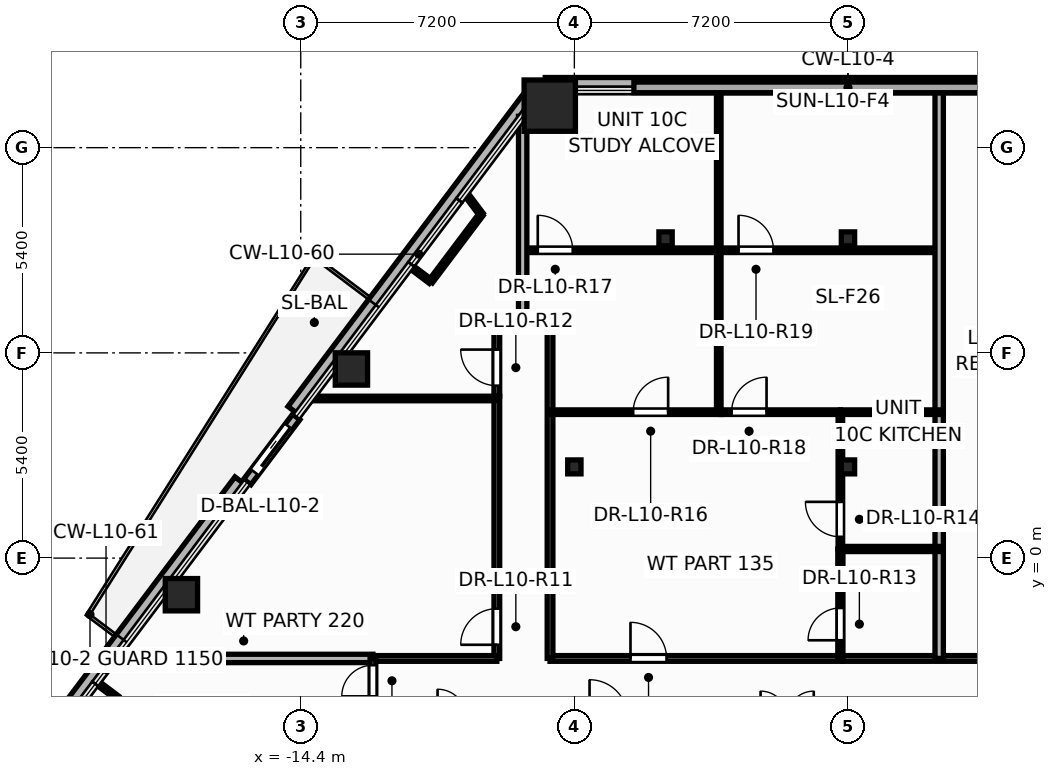
"""IFC4 building model, lengths in metres.
Left out: names, types, materials, properties, quantities, classifications, styles, units other than length and angle.
Written with IfcOpenShell. Run it as: python <this file> out.ifc"""

import sys

from ifc_helpers import new_model, si_unit, direction, frame, frame_2d, origin, origin_2d, place, context, subcontext, project, spatial, rectangle, hollow_rectangle, hollow_circle, i_section, extrude, element, fill, save


model = new_model("IFC4")
c1 = context("Model", 3, precision=1e-05, world=origin(), true_north=direction((0.0, 1.0)))
c2 = subcontext(c1, "Body", "Model", "MODEL_VIEW")
j1 = project(units=[si_unit("LENGTHUNIT", "METRE"), si_unit("PLANEANGLEUNIT", "RADIAN")], contexts=[c1])
p1 = place(None, origin())
s1 = spatial("IfcSite", under=j1, at=p1, CompositionType="ELEMENT")
p2 = place(p1, origin())
s2 = spatial("IfcBuilding", under=s1, at=p2, CompositionType="ELEMENT")
p3 = place(p2, frame((0.0, 0.0, 42.3)))
s3 = spatial("IfcBuildingStorey", under=s2, at=p3, CompositionType="ELEMENT", Elevation=42.3)
p4 = place(p3, frame((-7.847, 11.906, 0.0), z_axis=(0.0, 0.0, 1.0), x_axis=(1.0, 0.0, 0.0)))
e1 = element("IfcColumn", 1, at=p4, inside=s3, PredefinedType="COLUMN", context=c2, shape_type="SweptSolid", body=[
    extrude(hollow_rectangle(XDim=1.35, YDim=1.35, WallThickness=0.065, at=origin_2d()), origin(), (0.0, 0.0, 1.0), 3.6),
])
for number, where, z_axis, x_axis in (
    (2, (-13.066, 4.976, 0.0), (0.0, 0.0, 1.0), (1.0, 0.0, 0.0)),
    (3, (-17.54, -0.963, 0.0), (0.0, 0.0, 1.0), (1.0, 0.0, 0.0)),
):
    element("IfcColumn", number, at=place(p3, frame(where, z_axis=z_axis, x_axis=x_axis)), inside=s3, PredefinedType="COLUMN", context=c2, shape_type="SweptSolid", body=[
        extrude(hollow_circle(Radius=0.425, WallThickness=0.038, at=origin_2d()), origin(), (0.0, 0.0, 1.0), 3.6),
    ])
for number, where, z_axis, x_axis in (
    (4, (-7.2, 2.4, 0.0), (0.0, 0.0, 1.0), (1.0, 0.0, 0.0)),
    (5, (0.0, 2.4, 0.0), (0.0, 0.0, 1.0), (1.0, 0.0, 0.0)),
    (6, (-4.8, 8.4, 0.0), (0.0, 0.0, 1.0), (1.0, 0.0, 0.0)),
    (7, (0.0, 8.4, 0.0), (0.0, 0.0, 1.0), (1.0, 0.0, 0.0)),
):
    element("IfcColumn", number, at=place(p3, frame(where, z_axis=z_axis, x_axis=x_axis)), inside=s3, PredefinedType="COLUMN", context=c2, shape_type="SweptSolid", body=[
        extrude(i_section(OverallWidth=0.35, OverallDepth=0.367, WebThickness=0.025, FlangeThickness=0.032, at=origin_2d()), origin(), (0.0, 0.0, 1.0), 3.6),
    ])
p5 = place(p3, frame((7.967, 12.466, -0.2), z_axis=(0.0, 0.0, 1.0), x_axis=(-1.0, 0.0, 0.0)))
e8 = element("IfcWall", 8, at=p5, inside=s3, PredefinedType="PARAPET", context=c2, shape_type="SweptSolid", body=[
    extrude(rectangle(XDim=15.934, YDim=0.36, at=frame_2d((7.967, 0.0))), origin(), (0.0, 0.0, 1.0), 0.38),
])
p6 = place(p3, frame((-8.247, 12.306, -0.2), z_axis=(0.0, 0.0, 1.0), x_axis=(-0.6016246984, -0.798778894486, 0.0)))
e9 = element("IfcWall", 9, at=p6, inside=s3, PredefinedType="PARAPET", context=c2, shape_type="SweptSolid", body=[
    extrude(rectangle(XDim=10.547, YDim=0.36, at=frame_2d((5.273, 0.0))), origin(), (0.0, 0.0, 1.0), 0.38),
])
p7 = place(p3, frame((-15.988, 2.029, -0.2), z_axis=(0.0, 0.0, 1.0), x_axis=(-0.601631217198, -0.798773984612, 0.0)))
e10 = element("IfcWall", 10, at=p7, inside=s3, PredefinedType="PARAPET", context=c2, shape_type="SweptSolid", body=[
    extrude(rectangle(XDim=12.18, YDim=0.36, at=frame_2d((6.09, 0.0))), origin(), (0.0, 0.0, 1.0), 0.38),
])
p8 = place(p3, frame((-14.518, 3.713, -0.015), z_axis=(0.0, 0.0, 1.0), x_axis=(-0.601696267697, -0.79872498486, 0.0)))
e11 = element("IfcWall", 11, at=p8, inside=s3, PredefinedType="STANDARD", context=c2, shape_type="SweptSolid", body=[
    extrude(rectangle(XDim=2.14, YDim=0.24, at=frame_2d((1.07, 0.0))), origin(), (0.0, 0.0, 1.0), 2.729),
])
p9 = place(p8, frame((0.32, 0.0, 0.015)))
e12 = element("IfcOpeningElement", 12, at=p9, cuts=e11, PredefinedType="OPENING", context=c2, shape_type="SweptSolid", body=[
    extrude(rectangle(XDim=1.506, YDim=2.204, at=frame_2d((0.75, 1.102))), frame((0.0, 0.13, 0.0), z_axis=(0.0, -1.0, 0.0), x_axis=(1.0, 0.0, 0.0)), (0.0, 0.0, 1.0), 0.26),
])
p10 = place(p3, frame((-7.84, -2.64, 0.0), z_axis=(0.0, 0.0, 1.0), x_axis=(1.0, 0.0, 0.0)))
e13 = element("IfcWall", 13, at=p10, inside=s3, PredefinedType="PARTITIONING", context=c2, shape_type="SweptSolid", body=[
    extrude(rectangle(XDim=7.7, YDim=0.15, at=frame_2d((3.85, 0.0))), origin(), (0.0, 0.0, 1.0), 2.325),
])
p11 = place(p10, frame((2.117, 0.0, 0.0)))
e14 = element("IfcOpeningElement", 14, at=p11, cuts=e13, PredefinedType="OPENING", context=c2, shape_type="SweptSolid", body=[
    extrude(rectangle(XDim=0.956, YDim=2.104, at=frame_2d((0.475, 1.052))), frame((0.0, 0.085, 0.0), z_axis=(0.0, -1.0, 0.0), x_axis=(1.0, 0.0, 0.0)), (0.0, 0.0, 1.0), 0.17),
])
p12 = place(p3, frame((-9.24, -2.64, 0.0), z_axis=(0.0, 0.0, 1.0), x_axis=(0.0, 1.0, 0.0)))
e15 = element("IfcWall", 15, at=p12, inside=s3, PredefinedType="PARTITIONING", context=c2, shape_type="SweptSolid", body=[
    extrude(rectangle(XDim=6.9, YDim=0.15, at=frame_2d((3.45, 0.0))), origin(), (0.0, 0.0, 1.0), 2.509),
])
p13 = place(p12, frame((0.36, 0.0, 0.0)))
e16 = element("IfcOpeningElement", 16, at=p13, cuts=e15, PredefinedType="OPENING", context=c2, shape_type="SweptSolid", body=[
    extrude(rectangle(XDim=0.956, YDim=2.104, at=frame_2d((0.475, 1.052))), frame((0.0, 0.085, 0.0), z_axis=(0.0, -1.0, 0.0), x_axis=(1.0, 0.0, 0.0)), (0.0, 0.0, 1.0), 0.17),
])
p14 = place(p3, frame((-19.304, -2.64, 0.0), z_axis=(0.0, 0.0, 1.0), x_axis=(1.0, 0.0, 0.0)))
e17 = element("IfcWall", 17, at=p14, inside=s3, PredefinedType="PARTITIONING", context=c2, shape_type="SweptSolid", body=[
    extrude(rectangle(XDim=6.804, YDim=0.22, at=frame_2d((3.402, 0.0))), origin(), (0.0, 0.0, 1.0), 2.713),
])
p15 = place(p3, frame((-7.84, -2.64, 0.0), z_axis=(0.0, 0.0, 1.0), x_axis=(0.0, 1.0, 0.0)))
e18 = element("IfcWall", 18, at=p15, inside=s3, PredefinedType="PARTITIONING", context=c2, shape_type="SweptSolid", body=[
    extrude(rectangle(XDim=8.84, YDim=0.15, at=frame_2d((4.42, 0.0))), origin(), (0.0, 0.0, 1.0), 2.509),
])
p16 = place(p3, frame((-3.4, 8.1, 0.0), z_axis=(0.0, 0.0, 1.0), x_axis=(1.0, 0.0, 0.0)))
e19 = element("IfcWall", 19, at=p16, inside=s3, PredefinedType="PARTITIONING", context=c2, shape_type="SweptSolid", body=[
    extrude(rectangle(XDim=5.8, YDim=0.12, at=frame_2d((2.9, 0.0))), origin(), (0.0, 0.0, 1.0), 2.325),
])
p17 = place(p16, frame((0.52, 0.0, 0.0)))
e20 = element("IfcOpeningElement", 20, at=p17, cuts=e19, PredefinedType="OPENING", context=c2, shape_type="SweptSolid", body=[
    extrude(rectangle(XDim=0.926, YDim=2.104, at=frame_2d((0.46, 1.052))), frame((0.0, 0.07, 0.0), z_axis=(0.0, -1.0, 0.0), x_axis=(1.0, 0.0, 0.0)), (0.0, 0.0, 1.0), 0.14),
])
p18 = place(p3, frame((-0.138, -2.64, 0.0), z_axis=(0.0, 0.0, 1.0), x_axis=(1.0, 0.0, 0.0)))
e21 = element("IfcWall", 21, at=p18, inside=s3, PredefinedType="PARTITIONING", context=c2, shape_type="SweptSolid", body=[
    extrude(rectangle(XDim=7.978, YDim=0.15, at=frame_2d((3.989, 0.0))), origin(), (0.0, 0.0, 1.0), 2.325),
])
p19 = place(p3, frame((-8.56, 8.1, 0.0), z_axis=(0.0, 0.0, 1.0), x_axis=(1.0, 0.0, 0.0)))
e22 = element("IfcWall", 22, at=p19, inside=s3, PredefinedType="PARTITIONING", context=c2, shape_type="SweptSolid", body=[
    extrude(rectangle(XDim=5.16, YDim=0.12, at=frame_2d((2.58, 0.0))), origin(), (0.0, 0.0, 1.0), 2.509),
])
p20 = place(p19, frame((0.397, 0.0, 0.0)))
e23 = element("IfcOpeningElement", 23, at=p20, cuts=e22, PredefinedType="OPENING", context=c2, shape_type="SweptSolid", body=[
    extrude(rectangle(XDim=0.926, YDim=2.104, at=frame_2d((0.46, 1.052))), frame((0.0, 0.07, 0.0), z_axis=(0.0, -1.0, 0.0), x_axis=(1.0, 0.0, 0.0)), (0.0, 0.0, 1.0), 0.14),
])
p21 = place(p3, frame((-14.152, 4.2, 0.0), z_axis=(0.0, 0.0, 1.0), x_axis=(1.0, 0.0, 0.0)))
e24 = element("IfcWall", 24, at=p21, inside=s3, PredefinedType="PARTITIONING", context=c2, shape_type="SweptSolid", body=[
    extrude(rectangle(XDim=4.912, YDim=0.12, at=frame_2d((2.456, 0.0))), origin(), (0.0, 0.0, 1.0), 2.713),
])
p22 = place(p3, frame((-7.84, 3.84, 0.0), z_axis=(0.0, 0.0, 1.0), x_axis=(1.0, 0.0, 0.0)))
e25 = element("IfcWall", 25, at=p22, inside=s3, PredefinedType="PARTITIONING", context=c2, shape_type="SweptSolid", body=[
    extrude(rectangle(XDim=4.5, YDim=0.12, at=frame_2d((2.25, 0.0))), origin(), (0.0, 0.0, 1.0), 2.509),
])
p23 = place(p22, frame((2.188, 0.0, 0.0)))
e26 = element("IfcOpeningElement", 26, at=p23, cuts=e25, PredefinedType="OPENING", context=c2, shape_type="SweptSolid", body=[
    extrude(rectangle(XDim=0.926, YDim=2.104, at=frame_2d((0.46, 1.052))), frame((0.0, 0.07, 0.0), z_axis=(0.0, -1.0, 0.0), x_axis=(1.0, 0.0, 0.0)), (0.0, 0.0, 1.0), 0.14),
])
p24 = place(p3, frame((-3.4, 3.84, 0.0), z_axis=(0.0, 0.0, 1.0), x_axis=(0.0, 1.0, 0.0)))
e27 = element("IfcWall", 27, at=p24, inside=s3, PredefinedType="PARTITIONING", context=c2, shape_type="SweptSolid", body=[
    extrude(rectangle(XDim=8.466, YDim=0.12, at=frame_2d((4.233, 0.0))), origin(), (0.0, 0.0, 1.0), 2.509),
])
p25 = place(p3, frame((2.4, -2.64, 0.0), z_axis=(0.0, 0.0, 1.0), x_axis=(0.0, 1.0, 0.0)))
e28 = element("IfcWall", 28, at=p25, inside=s3, PredefinedType="PARTITIONING", context=c2, shape_type="SweptSolid", body=[
    extrude(rectangle(XDim=14.946, YDim=0.22, at=frame_2d((7.473, 0.0))), origin(), (0.0, 0.0, 1.0), 2.325),
])
p26 = place(p3, frame((-0.2, 0.24, 0.0), z_axis=(0.0, 0.0, 1.0), x_axis=(0.0, 1.0, 0.0)))
e29 = element("IfcWall", 29, at=p26, inside=s3, PredefinedType="PARTITIONING", context=c2, shape_type="SweptSolid", body=[
    extrude(rectangle(XDim=3.6, YDim=0.12, at=frame_2d((1.8, 0.0))), origin(), (0.0, 0.0, 1.0), 2.325),
])
p27 = place(p26, frame((0.32, 0.0, 0.0)))
e30 = element("IfcOpeningElement", 30, at=p27, cuts=e29, PredefinedType="OPENING", context=c2, shape_type="SweptSolid", body=[
    extrude(rectangle(XDim=0.926, YDim=2.104, at=frame_2d((0.46, 1.052))), frame((0.0, 0.07, 0.0), z_axis=(0.0, -1.0, 0.0), x_axis=(1.0, 0.0, 0.0)), (0.0, 0.0, 1.0), 0.14),
])
p28 = place(p3, frame((-8.56, 6.2, 0.0), z_axis=(0.0, 0.0, 1.0), x_axis=(0.0, 1.0, 0.0)))
e31 = element("IfcWall", 31, at=p28, inside=s3, PredefinedType="PARTITIONING", context=c2, shape_type="SweptSolid", body=[
    extrude(rectangle(XDim=5.425, YDim=0.22, at=frame_2d((2.712, 0.0))), origin(), (0.0, 0.0, 1.0), 2.509),
])
p29 = place(p3, frame((-12.5, -2.64, 0.0), z_axis=(0.0, 0.0, 1.0), x_axis=(1.0, 0.0, 0.0)))
e32 = element("IfcWall", 32, at=p29, inside=s3, PredefinedType="PARTITIONING", context=c2, shape_type="SweptSolid", body=[
    extrude(rectangle(XDim=3.26, YDim=0.15, at=frame_2d((1.63, 0.0))), origin(), (0.0, 0.0, 1.0), 3.35),
])
p30 = place(p3, frame((-3.338, 3.84, 0.0), z_axis=(0.0, 0.0, 1.0), x_axis=(1.0, 0.0, 0.0)))
e33 = element("IfcWall", 33, at=p30, inside=s3, PredefinedType="PARTITIONING", context=c2, shape_type="SweptSolid", body=[
    extrude(rectangle(XDim=3.138, YDim=0.12, at=frame_2d((1.569, 0.0))), origin(), (0.0, 0.0, 1.0), 2.325),
])
p31 = place(p30, frame((0.275, 0.0, 0.0)))
e34 = element("IfcOpeningElement", 34, at=p31, cuts=e33, PredefinedType="OPENING", context=c2, shape_type="SweptSolid", body=[
    extrude(rectangle(XDim=0.926, YDim=2.104, at=frame_2d((0.46, 1.052))), frame((0.0, 0.07, 0.0), z_axis=(0.0, -1.0, 0.0), x_axis=(1.0, 0.0, 0.0)), (0.0, 0.0, 1.0), 0.14),
])
p32 = place(p3, frame((-0.2, -2.64, 0.0), z_axis=(0.0, 0.0, 1.0), x_axis=(0.0, 1.0, 0.0)))
e35 = element("IfcWall", 35, at=p32, inside=s3, PredefinedType="PARTITIONING", context=c2, shape_type="SweptSolid", body=[
    extrude(rectangle(XDim=2.88, YDim=0.135, at=frame_2d((1.44, 0.0))), origin(), (0.0, 0.0, 1.0), 2.325),
])
p33 = place(p32, frame((0.478, 0.0, 0.0)))
e36 = element("IfcOpeningElement", 36, at=p33, cuts=e35, PredefinedType="OPENING", context=c2, shape_type="SweptSolid", body=[
    extrude(rectangle(XDim=0.856, YDim=2.104, at=frame_2d((0.425, 1.052))), frame((0.0, 0.078, 0.0), z_axis=(0.0, -1.0, 0.0), x_axis=(1.0, 0.0, 0.0)), (0.0, 0.0, 1.0), 0.155),
])
p34 = place(p3, frame((-0.2, 0.24, 0.0), z_axis=(0.0, 0.0, 1.0), x_axis=(1.0, 0.0, 0.0)))
e37 = element("IfcWall", 37, at=p34, inside=s3, PredefinedType="PARTITIONING", context=c2, shape_type="SweptSolid", body=[
    extrude(rectangle(XDim=2.6, YDim=0.135, at=frame_2d((1.3, 0.0))), origin(), (0.0, 0.0, 1.0), 2.325),
])
p35 = place(p3, frame((-0.2, 3.84, 0.0), z_axis=(0.0, 0.0, 1.0), x_axis=(1.0, 0.0, 0.0)))
e38 = element("IfcWall", 38, at=p35, inside=s3, PredefinedType="PARTITIONING", context=c2, shape_type="SweptSolid", body=[
    extrude(rectangle(XDim=2.6, YDim=0.12, at=frame_2d((1.3, 0.0))), origin(), (0.0, 0.0, 1.0), 2.325),
])
p36 = place(p3, frame((-9.651, 9.046, 0.0), z_axis=(0.0, 0.0, 1.0), x_axis=(-0.60167490335, -0.798741078622, 0.0)))
e39 = element("IfcWall", 39, at=p36, inside=s3, PredefinedType="PARTITIONING", context=c2, shape_type="SweptSolid", body=[
    extrude(rectangle(XDim=2.214, YDim=0.12, at=frame_2d((1.107, 0.0))), origin(), (0.0, 0.0, 1.0), 3.35),
])
p37 = place(p3, frame((-9.24, 4.262, 0.0), z_axis=(0.0, 0.0, 1.0), x_axis=(0.0, 1.0, 0.0)))
e40 = element("IfcWall", 40, at=p37, inside=s3, PredefinedType="PARTITIONING", context=c2, shape_type="SweptSolid", body=[
    extrude(rectangle(XDim=1.938, YDim=0.15, at=frame_2d((0.969, 0.0))), origin(), (0.0, 0.0, 1.0), 3.35),
])
p38 = place(p37, frame((0.275, 0.0, 0.0)))
e41 = element("IfcOpeningElement", 41, at=p38, cuts=e40, PredefinedType="OPENING", context=c2, shape_type="SweptSolid", body=[
    extrude(rectangle(XDim=0.956, YDim=2.104, at=frame_2d((0.475, 1.052))), frame((0.0, 0.085, 0.0), z_axis=(0.0, -1.0, 0.0), x_axis=(1.0, 0.0, 0.0)), (0.0, 0.0, 1.0), 0.17),
])
p39 = place(p3, frame((-12.5, -4.24, 0.0), z_axis=(0.0, 0.0, 1.0), x_axis=(0.0, 1.0, 0.0)))
e42 = element("IfcWall", 42, at=p39, inside=s3, PredefinedType="PARTITIONING", context=c2, shape_type="SweptSolid", body=[
    extrude(rectangle(XDim=1.6, YDim=0.15, at=frame_2d((0.8, 0.0))), origin(), (0.0, 0.0, 1.0), 2.325),
])
p40 = place(p39, frame((0.602, 0.0, 0.0)))
e43 = element("IfcOpeningElement", 43, at=p40, cuts=e42, PredefinedType="OPENING", context=c2, shape_type="SweptSolid", body=[
    extrude(rectangle(XDim=0.826, YDim=2.104, at=frame_2d((0.41, 1.052))), frame((0.0, 0.085, 0.0), z_axis=(0.0, -1.0, 0.0), x_axis=(1.0, 0.0, 0.0)), (0.0, 0.0, 1.0), 0.17),
])
p41 = place(p3, frame((-9.24, 6.2, 0.0), z_axis=(0.0, 0.0, 1.0), x_axis=(1.0, 0.0, 0.0)))
e44 = element("IfcWall", 44, at=p41, inside=s3, PredefinedType="PARTITIONING", context=c2, shape_type="SweptSolid", body=[
    extrude(rectangle(XDim=1.4, YDim=0.15, at=frame_2d((0.7, 0.0))), origin(), (0.0, 0.0, 1.0), 3.35),
])
p42 = place(p3, frame((-10.07, 9.603, 0.0), z_axis=(0.0, 0.0, 1.0), x_axis=(0.601455382011, -0.79890639217, 0.0)))
e45 = element("IfcWall", 45, at=p42, inside=s3, PredefinedType="PARTITIONING", context=c2, shape_type="SweptSolid", body=[
    extrude(rectangle(XDim=0.697, YDim=0.12, at=frame_2d((0.349, 0.0))), origin(), (0.0, 0.0, 1.0), 2.713),
])
p43 = place(p3, frame((-10.983, 7.277, 0.0), z_axis=(0.0, 0.0, 1.0), x_axis=(-0.798773936271, 0.601631281379, 0.0)))
e46 = element("IfcWall", 46, at=p43, inside=s3, PredefinedType="PARTITIONING", context=c2, shape_type="SweptSolid", body=[
    extrude(rectangle(XDim=0.67, YDim=0.12, at=frame_2d((0.335, 0.0))), origin(), (0.0, 0.0, 1.0), 2.713),
])
p44 = place(p3, frame((-19.767, -3.271, 0.0), z_axis=(0.0, 0.0, 1.0), x_axis=(0.798905778506, -0.601456197133, 0.0)))
e47 = element("IfcWall", 47, at=p44, inside=s3, PredefinedType="PARTITIONING", context=c2, shape_type="SweptSolid", body=[
    extrude(rectangle(XDim=0.67, YDim=0.12, at=frame_2d((0.335, 0.0))), origin(), (0.0, 0.0, 1.0), 2.713),
])
p45 = place(p9, origin())
e48 = element("IfcDoor", 48, at=p45, inside=s3, OperationType="SLIDING_TO_RIGHT", PredefinedType="DOOR", context=c2, shape_type="SweptSolid", body=[
    extrude(rectangle(XDim=1.5, YDim=2.2, at=frame_2d((0.75, 1.1))), frame((0.0, 0.025, 0.0), z_axis=(0.0, -1.0, 0.0), x_axis=(1.0, 0.0, 0.0)), (0.0, 0.0, 1.0), 0.05),
])
fill(e12, e48)
p46 = place(p40, origin())
e49 = element("IfcDoor", 49, at=p46, inside=s3, OperationType="SINGLE_SWING_LEFT", PredefinedType="DOOR", context=c2, shape_type="SweptSolid", body=[
    extrude(rectangle(XDim=0.82, YDim=2.1, at=frame_2d((0.41, 1.05))), frame((0.0, 0.025, 0.0), z_axis=(0.0, -1.0, 0.0), x_axis=(1.0, 0.0, 0.0)), (0.0, 0.0, 1.0), 0.05),
])
fill(e43, e49)
p47 = place(p13, origin())
e50 = element("IfcDoor", 50, at=p47, inside=s3, OperationType="SINGLE_SWING_LEFT", PredefinedType="DOOR", context=c2, shape_type="SweptSolid", body=[
    extrude(rectangle(XDim=0.95, YDim=2.1, at=frame_2d((0.475, 1.05))), frame((0.0, 0.025, 0.0), z_axis=(0.0, -1.0, 0.0), x_axis=(1.0, 0.0, 0.0)), (0.0, 0.0, 1.0), 0.05),
])
fill(e16, e50)
p48 = place(p38, origin())
e51 = element("IfcDoor", 51, at=p48, inside=s3, OperationType="SINGLE_SWING_RIGHT", PredefinedType="DOOR", context=c2, shape_type="SweptSolid", body=[
    extrude(rectangle(XDim=0.95, YDim=2.1, at=frame_2d((0.475, 1.05))), frame((0.0, 0.025, 0.0), z_axis=(0.0, -1.0, 0.0), x_axis=(1.0, 0.0, 0.0)), (0.0, 0.0, 1.0), 0.05),
])
fill(e41, e51)
p49 = place(p33, origin())
e52 = element("IfcDoor", 52, at=p49, inside=s3, OperationType="SINGLE_SWING_LEFT", PredefinedType="DOOR", context=c2, shape_type="SweptSolid", body=[
    extrude(rectangle(XDim=0.85, YDim=2.1, at=frame_2d((0.425, 1.05))), frame((0.0, 0.025, 0.0), z_axis=(0.0, -1.0, 0.0), x_axis=(1.0, 0.0, 0.0)), (0.0, 0.0, 1.0), 0.05),
])
fill(e36, e52)
p50 = place(p27, origin())
e53 = element("IfcDoor", 53, at=p50, inside=s3, OperationType="SINGLE_SWING_RIGHT", PredefinedType="DOOR", context=c2, shape_type="SweptSolid", body=[
    extrude(rectangle(XDim=0.92, YDim=2.1, at=frame_2d((0.46, 1.05))), frame((0.0, 0.025, 0.0), z_axis=(0.0, -1.0, 0.0), x_axis=(1.0, 0.0, 0.0)), (0.0, 0.0, 1.0), 0.05),
])
fill(e30, e53)
p51 = place(p11, origin())
e54 = element("IfcDoor", 54, at=p51, inside=s3, OperationType="SINGLE_SWING_LEFT", PredefinedType="DOOR", context=c2, shape_type="SweptSolid", body=[
    extrude(rectangle(XDim=0.95, YDim=2.1, at=frame_2d((0.475, 1.05))), frame((0.0, 0.025, 0.0), z_axis=(0.0, -1.0, 0.0), x_axis=(1.0, 0.0, 0.0)), (0.0, 0.0, 1.0), 0.05),
])
fill(e14, e54)
p52 = place(p23, origin())
e55 = element("IfcDoor", 55, at=p52, inside=s3, OperationType="SINGLE_SWING_RIGHT", PredefinedType="DOOR", context=c2, shape_type="SweptSolid", body=[
    extrude(rectangle(XDim=0.92, YDim=2.1, at=frame_2d((0.46, 1.05))), frame((0.0, 0.025, 0.0), z_axis=(0.0, -1.0, 0.0), x_axis=(1.0, 0.0, 0.0)), (0.0, 0.0, 1.0), 0.05),
])
fill(e26, e55)
p53 = place(p20, origin())
e56 = element("IfcDoor", 56, at=p53, inside=s3, OperationType="SINGLE_SWING_LEFT", PredefinedType="DOOR", context=c2, shape_type="SweptSolid", body=[
    extrude(rectangle(XDim=0.92, YDim=2.1, at=frame_2d((0.46, 1.05))), frame((0.0, 0.025, 0.0), z_axis=(0.0, -1.0, 0.0), x_axis=(1.0, 0.0, 0.0)), (0.0, 0.0, 1.0), 0.05),
])
fill(e23, e56)
p54 = place(p31, origin())
e57 = element("IfcDoor", 57, at=p54, inside=s3, OperationType="SINGLE_SWING_RIGHT", PredefinedType="DOOR", context=c2, shape_type="SweptSolid", body=[
    extrude(rectangle(XDim=0.92, YDim=2.1, at=frame_2d((0.46, 1.05))), frame((0.0, 0.025, 0.0), z_axis=(0.0, -1.0, 0.0), x_axis=(1.0, 0.0, 0.0)), (0.0, 0.0, 1.0), 0.05),
])
fill(e34, e57)
p55 = place(p17, origin())
e58 = element("IfcDoor", 58, at=p55, inside=s3, OperationType="SINGLE_SWING_LEFT", PredefinedType="DOOR", context=c2, shape_type="SweptSolid", body=[
    extrude(rectangle(XDim=0.92, YDim=2.1, at=frame_2d((0.46, 1.05))), frame((0.0, 0.025, 0.0), z_axis=(0.0, -1.0, 0.0), x_axis=(1.0, 0.0, 0.0)), (0.0, 0.0, 1.0), 0.05),
])
fill(e20, e58)
save(model, sys.argv[1])
